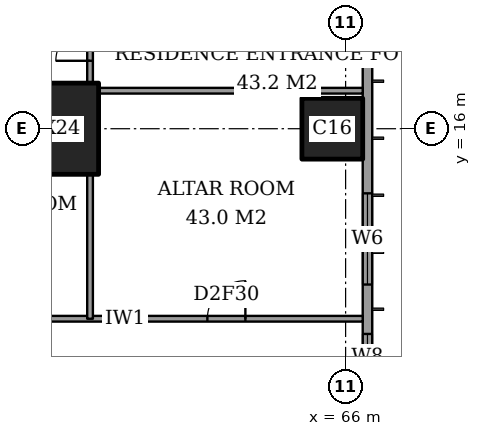
"""IFC4 building model, lengths in metres.
Left out: names, types, materials, properties, quantities, classifications, styles, units other than length and angle.
Written with IfcOpenShell. Run it as: python <this file> out.ifc"""

import sys

from ifc_helpers import new_model, si_unit, direction, frame, frame_2d, origin, origin_2d, place, context, subcontext, project, spatial, rectangle, extrude, element, fill, save


model = new_model("IFC4")
c1 = context("Model", 3, precision=1e-05, world=origin(), true_north=direction((0.0, 1.0)))
c2 = subcontext(c1, "Body", "Model", "MODEL_VIEW")
j1 = project(units=[si_unit("LENGTHUNIT", "METRE"), si_unit("PLANEANGLEUNIT", "RADIAN")], contexts=[c1])
p1 = place(None, origin())
s1 = spatial("IfcSite", under=j1, at=p1, CompositionType="ELEMENT")
p2 = place(p1, origin())
s2 = spatial("IfcBuilding", under=s1, at=p2, CompositionType="ELEMENT")
p3 = place(p2, frame((0.0, 0.0, 230.4)))
s3 = spatial("IfcBuildingStorey", under=s2, at=p3, CompositionType="ELEMENT", Elevation=230.4)
p4 = place(p3, frame((58.0, 16.0, 0.0), z_axis=(0.0, 0.0, 1.0), x_axis=(1.0, 0.0, 0.0)))
e1 = element("IfcColumn", 1, at=p4, inside=s3, PredefinedType="COLUMN", context=c2, shape_type="SweptSolid", body=[
    extrude(rectangle(XDim=3.0, YDim=2.4, at=origin_2d()), origin(), (0.0, 0.0, 1.0), 3.6),
])
p5 = place(p3, frame((65.65, 16.0, 0.0), z_axis=(0.0, 0.0, 1.0), x_axis=(1.0, 0.0, 0.0)))
e2 = element("IfcColumn", 2, at=p5, inside=s3, PredefinedType="COLUMN", context=c2, shape_type="SweptSolid", body=[
    extrude(rectangle(XDim=1.6, YDim=1.6, at=origin_2d()), origin(), (0.0, 0.0, 1.0), 3.6),
])
p6 = place(p3, frame((66.575, 3.175, 0.0), z_axis=(0.0, 0.0, 1.0), x_axis=(0.0, 1.0, 0.0)))
e3 = element("IfcWall", 3, at=p6, inside=s3, PredefinedType="SOLIDWALL", context=c2, shape_type="SweptSolid", body=[
    extrude(rectangle(XDim=41.65, YDim=0.25, at=frame_2d((20.825, 0.0))), origin(), (0.0, 0.0, 1.0), 3.6),
])
p7 = place(p6, frame((0.875, 0.0, 0.6)))
e4 = element("IfcOpeningElement", 4, at=p7, cuts=e3, PredefinedType="OPENING", context=c2, shape_type="SweptSolid", body=[
    extrude(rectangle(XDim=2.4, YDim=2.0, at=frame_2d((1.2, 1.0))), frame((0.0, 0.135, 0.0), z_axis=(0.0, -1.0, 0.0), x_axis=(1.0, 0.0, 0.0)), (0.0, 0.0, 1.0), 0.27),
])
p8 = place(p6, frame((6.225, 0.0, 0.6)))
e5 = element("IfcOpeningElement", 5, at=p8, cuts=e3, PredefinedType="OPENING", context=c2, shape_type="SweptSolid", body=[
    extrude(rectangle(XDim=1.2, YDim=2.0, at=frame_2d((0.6, 1.0))), frame((0.0, 0.135, 0.0), z_axis=(0.0, -1.0, 0.0), x_axis=(1.0, 0.0, 0.0)), (0.0, 0.0, 1.0), 0.27),
])
p9 = place(p6, frame((8.725, 0.0, 0.6)))
e6 = element("IfcOpeningElement", 6, at=p9, cuts=e3, PredefinedType="OPENING", context=c2, shape_type="SweptSolid", body=[
    extrude(rectangle(XDim=2.4, YDim=2.0, at=frame_2d((1.2, 1.0))), frame((0.0, 0.135, 0.0), z_axis=(0.0, -1.0, 0.0), x_axis=(1.0, 0.0, 0.0)), (0.0, 0.0, 1.0), 0.27),
])
p10 = place(p6, frame((15.725, 0.0, 0.6)))
e7 = element("IfcOpeningElement", 7, at=p10, cuts=e3, PredefinedType="OPENING", context=c2, shape_type="SweptSolid", body=[
    extrude(rectangle(XDim=2.4, YDim=2.0, at=frame_2d((1.2, 1.0))), frame((0.0, 0.135, 0.0), z_axis=(0.0, -1.0, 0.0), x_axis=(1.0, 0.0, 0.0)), (0.0, 0.0, 1.0), 0.27),
])
p11 = place(p6, frame((23.525, 0.0, 0.6)))
e8 = element("IfcOpeningElement", 8, at=p11, cuts=e3, PredefinedType="OPENING", context=c2, shape_type="SweptSolid", body=[
    extrude(rectangle(XDim=2.4, YDim=2.0, at=frame_2d((1.2, 1.0))), frame((0.0, 0.135, 0.0), z_axis=(0.0, -1.0, 0.0), x_axis=(1.0, 0.0, 0.0)), (0.0, 0.0, 1.0), 0.27),
])
p12 = place(p6, frame((30.725, 0.0, 0.6)))
e9 = element("IfcOpeningElement", 9, at=p12, cuts=e3, PredefinedType="OPENING", context=c2, shape_type="SweptSolid", body=[
    extrude(rectangle(XDim=2.4, YDim=2.0, at=frame_2d((1.2, 1.0))), frame((0.0, 0.135, 0.0), z_axis=(0.0, -1.0, 0.0), x_axis=(1.0, 0.0, 0.0)), (0.0, 0.0, 1.0), 0.27),
])
p13 = place(p6, frame((34.525, 0.0, 0.6)))
e10 = element("IfcOpeningElement", 10, at=p13, cuts=e3, PredefinedType="OPENING", context=c2, shape_type="SweptSolid", body=[
    extrude(rectangle(XDim=1.2, YDim=2.0, at=frame_2d((0.6, 1.0))), frame((0.0, 0.135, 0.0), z_axis=(0.0, -1.0, 0.0), x_axis=(1.0, 0.0, 0.0)), (0.0, 0.0, 1.0), 0.27),
])
p14 = place(p6, frame((38.375, 0.0, 0.6)))
e11 = element("IfcOpeningElement", 11, at=p14, cuts=e3, PredefinedType="OPENING", context=c2, shape_type="SweptSolid", body=[
    extrude(rectangle(XDim=2.4, YDim=2.0, at=frame_2d((1.2, 1.0))), frame((0.0, 0.135, 0.0), z_axis=(0.0, -1.0, 0.0), x_axis=(1.0, 0.0, 0.0)), (0.0, 0.0, 1.0), 0.27),
])
p15 = place(p3, frame((41.439, 11.0, 0.0), z_axis=(0.0, 0.0, 1.0), x_axis=(1.0, 0.0, 0.0)))
e12 = element("IfcWall", 12, at=p15, inside=s3, PredefinedType="PARTITIONING", context=c2, shape_type="SweptSolid", body=[
    extrude(rectangle(XDim=25.011, YDim=0.15, at=frame_2d((12.505, 0.0))), origin(), (0.0, 0.0, 1.0), 3.35),
])
p16 = place(p15, frame((12.361, 0.0, 0.0)))
e13 = element("IfcOpeningElement", 13, at=p16, cuts=e12, PredefinedType="OPENING", context=c2, shape_type="SweptSolid", body=[
    extrude(rectangle(XDim=1.0, YDim=2.1, at=frame_2d((0.5, 1.05))), frame((0.0, 0.085, 0.0), z_axis=(0.0, -1.0, 0.0), x_axis=(1.0, 0.0, 0.0)), (0.0, 0.0, 1.0), 0.17),
])
p17 = place(p15, frame((20.924, 0.0, 0.0)))
e14 = element("IfcOpeningElement", 14, at=p17, cuts=e12, PredefinedType="OPENING", context=c2, shape_type="SweptSolid", body=[
    extrude(rectangle(XDim=1.0, YDim=2.1, at=frame_2d((0.5, 1.05))), frame((0.0, 0.085, 0.0), z_axis=(0.0, -1.0, 0.0), x_axis=(1.0, 0.0, 0.0)), (0.0, 0.0, 1.0), 0.17),
])
p18 = place(p15, frame((15.448, 0.0, 0.0)))
e15 = element("IfcOpeningElement", 15, at=p18, cuts=e12, PredefinedType="OPENING", context=c2, shape_type="SweptSolid", body=[
    extrude(rectangle(XDim=0.9, YDim=2.1, at=frame_2d((0.45, 1.05))), frame((0.0, 0.085, 0.0), z_axis=(0.0, -1.0, 0.0), x_axis=(1.0, 0.0, 0.0)), (0.0, 0.0, 1.0), 0.17),
])
p19 = place(p15, frame((9.961, 0.0, 0.0)))
e16 = element("IfcOpeningElement", 16, at=p19, cuts=e12, PredefinedType="OPENING", context=c2, shape_type="SweptSolid", body=[
    extrude(rectangle(XDim=1.0, YDim=2.1, at=frame_2d((0.5, 1.05))), frame((0.0, 0.085, 0.0), z_axis=(0.0, -1.0, 0.0), x_axis=(1.0, 0.0, 0.0)), (0.0, 0.0, 1.0), 0.17),
])
p20 = place(p15, frame((7.411, 0.0, 0.0)))
e17 = element("IfcOpeningElement", 17, at=p20, cuts=e12, PredefinedType="OPENING", context=c2, shape_type="SweptSolid", body=[
    extrude(rectangle(XDim=0.9, YDim=2.1, at=frame_2d((0.45, 1.05))), frame((0.0, 0.085, 0.0), z_axis=(0.0, -1.0, 0.0), x_axis=(1.0, 0.0, 0.0)), (0.0, 0.0, 1.0), 0.17),
])
p21 = place(p15, frame((2.836, 0.0, 0.0)))
e18 = element("IfcOpeningElement", 18, at=p21, cuts=e12, PredefinedType="OPENING", context=c2, shape_type="SweptSolid", body=[
    extrude(rectangle(XDim=1.0, YDim=2.1, at=frame_2d((0.5, 1.05))), frame((0.0, 0.085, 0.0), z_axis=(0.0, -1.0, 0.0), x_axis=(1.0, 0.0, 0.0)), (0.0, 0.0, 1.0), 0.17),
])
p22 = place(p3, frame((59.5, 17.0, 0.0), z_axis=(0.0, 0.0, 1.0), x_axis=(1.0, 0.0, 0.0)))
e19 = element("IfcWall", 19, at=p22, inside=s3, PredefinedType="PARTITIONING", context=c2, shape_type="SweptSolid", body=[
    extrude(rectangle(XDim=6.95, YDim=0.15, at=frame_2d((3.475, 0.0))), origin(), (0.0, 0.0, 1.0), 3.35),
])
p23 = place(p3, frame((59.275, 11.0, 0.0), z_axis=(0.0, 0.0, 1.0), x_axis=(0.0, 1.0, 0.0)))
e20 = element("IfcWall", 20, at=p23, inside=s3, PredefinedType="PARTITIONING", context=c2, shape_type="SweptSolid", body=[
    extrude(rectangle(XDim=3.8, YDim=0.15, at=frame_2d((1.9, 0.0))), origin(), (0.0, 0.0, 1.0), 3.35),
])
p24 = place(p3, frame((59.275, 17.2, 0.0), z_axis=(0.0, 0.0, 1.0), x_axis=(0.0, 1.0, 0.0)))
e21 = element("IfcWall", 21, at=p24, inside=s3, PredefinedType="PARTITIONING", context=c2, shape_type="SweptSolid", body=[
    extrude(rectangle(XDim=2.45, YDim=0.15, at=frame_2d((1.225, 0.0))), origin(), (0.0, 0.0, 1.0), 3.35),
])
p25 = place(p24, frame((0.587, 0.0, 0.0)))
e22 = element("IfcOpeningElement", 22, at=p25, cuts=e21, PredefinedType="OPENING", context=c2, shape_type="SweptSolid", body=[
    extrude(rectangle(XDim=0.9, YDim=2.1, at=frame_2d((0.45, 1.05))), frame((0.0, 0.085, 0.0), z_axis=(0.0, -1.0, 0.0), x_axis=(1.0, 0.0, 0.0)), (0.0, 0.0, 1.0), 0.17),
])
p26 = place(p8, origin())
e23 = element("IfcWindow", 23, at=p26, inside=s3, PartitioningType="SINGLE_PANEL", PredefinedType="WINDOW", context=c2, shape_type="SweptSolid", body=[
    extrude(rectangle(XDim=1.2, YDim=2.0, at=frame_2d((0.6, 1.0))), frame((0.0, 0.03, 0.0), z_axis=(0.0, -1.0, 0.0), x_axis=(1.0, 0.0, 0.0)), (0.0, 0.0, 1.0), 0.06),
])
fill(e5, e23)
p27 = place(p9, origin())
e24 = element("IfcWindow", 24, at=p27, inside=s3, PartitioningType="SINGLE_PANEL", PredefinedType="WINDOW", context=c2, shape_type="SweptSolid", body=[
    extrude(rectangle(XDim=2.4, YDim=2.0, at=frame_2d((1.2, 1.0))), frame((0.0, 0.03, 0.0), z_axis=(0.0, -1.0, 0.0), x_axis=(1.0, 0.0, 0.0)), (0.0, 0.0, 1.0), 0.06),
])
fill(e6, e24)
p28 = place(p17, origin())
e25 = element("IfcDoor", 25, at=p28, inside=s3, OperationType="SINGLE_SWING_LEFT", PredefinedType="DOOR", context=c2, shape_type="SweptSolid", body=[
    extrude(rectangle(XDim=1.0, YDim=2.1, at=frame_2d((0.5, 1.05))), frame((0.0, 0.025, 0.0), z_axis=(0.0, -1.0, 0.0), x_axis=(1.0, 0.0, 0.0)), (0.0, 0.0, 1.0), 0.05),
])
fill(e14, e25)
p29 = place(p25, origin())
e26 = element("IfcDoor", 26, at=p29, inside=s3, OperationType="SINGLE_SWING_RIGHT", PredefinedType="DOOR", context=c2, shape_type="SweptSolid", body=[
    extrude(rectangle(XDim=0.9, YDim=2.1, at=frame_2d((0.45, 1.05))), frame((0.0, 0.025, 0.0), z_axis=(0.0, -1.0, 0.0), x_axis=(1.0, 0.0, 0.0)), (0.0, 0.0, 1.0), 0.05),
])
fill(e22, e26)
save(model, sys.argv[1])
